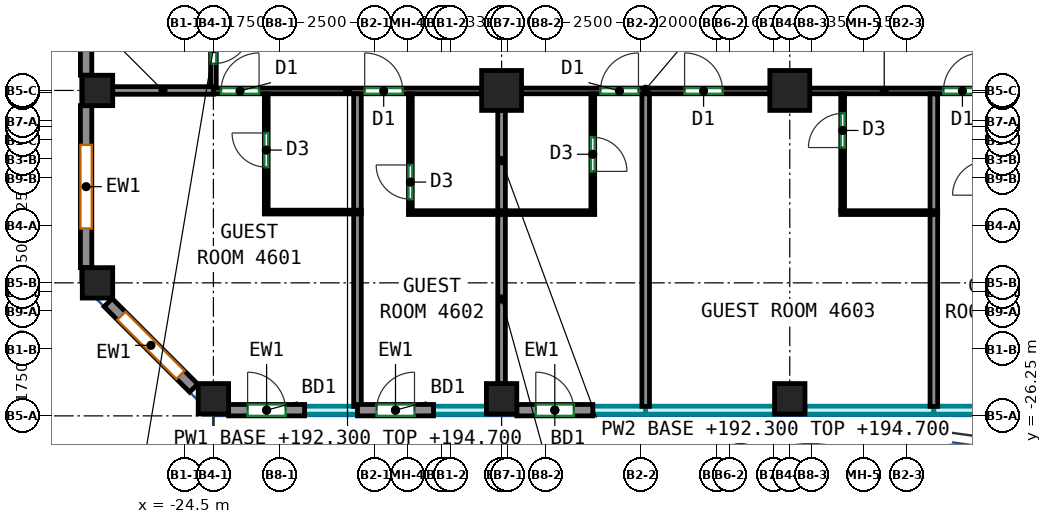
"""IFC4 building model, lengths in metres.
Left out: names, types, materials, properties, quantities, classifications, styles, units other than length and angle.
Written with IfcOpenShell. Run it as: python <this file> out.ifc"""

import sys

from ifc_helpers import new_model, si_unit, direction, frame, frame_2d, origin, origin_2d, place, context, subcontext, project, spatial, rectangle, extrude, source, transform, mapped, element, fill, save


model = new_model("IFC4")
c1 = context("Model", 3, precision=1e-05, world=origin(), true_north=direction((0.0, 1.0)))
c2 = subcontext(c1, "Body", "Model", "MODEL_VIEW")
j1 = project(units=[si_unit("LENGTHUNIT", "METRE"), si_unit("PLANEANGLEUNIT", "RADIAN")], contexts=[c1])
p1 = place(None, origin())
s1 = spatial("IfcSite", under=j1, at=p1, CompositionType="ELEMENT")
p2 = place(p1, origin())
s2 = spatial("IfcBuilding", under=s1, at=p2, CompositionType="ELEMENT")
p3 = place(p2, frame((0.0, 0.0, 192.3)))
s3 = spatial("IfcBuildingStorey", under=s2, at=p3, CompositionType="ELEMENT", Elevation=192.3)
m1 = source(origin(), c2, "Body", "SweptSolid", [
    extrude(rectangle(XDim=0.8, YDim=0.8, at=origin_2d()), origin(), (0.0, 0.0, 1.0), 3.0),
])
for number, where, z_axis, x_axis in (
    (1, (-26.8, -22.75, 0.0), (0.0, 0.0, 1.0), (1.0, 0.0, 0.0)),
    (2, (-26.8, -17.688, 0.0), (0.0, 0.0, 1.0), (1.0, 0.0, 0.0)),
    (3, (-23.75, -25.8, 0.0), (0.0, 0.0, 1.0), (1.0, 0.0, 0.0)),
    (4, (-16.167, -25.8, 0.0), (0.0, 0.0, 1.0), (1.0, 0.0, 0.0)),
):
    element("IfcColumn", number, at=place(p3, frame(where, z_axis=z_axis, x_axis=x_axis)), inside=s3, PredefinedType="COLUMN", context=c2, shape_type="MappedRepresentation", body=[
        mapped(m1, transform((0.0, 0.0, 0.0))),
    ])
m2 = source(origin(), c2, "Body", "SweptSolid", [
    extrude(rectangle(XDim=1.05, YDim=1.05, at=origin_2d()), origin(), (0.0, 0.0, 1.0), 3.0),
])
p4 = place(p3, frame((-16.167, -17.688, 0.0), z_axis=(0.0, 0.0, 1.0), x_axis=(1.0, 0.0, 0.0)))
e5 = element("IfcColumn", 5, at=p4, inside=s3, PredefinedType="COLUMN", context=c2, shape_type="MappedRepresentation", body=[
    mapped(m2, transform((0.0, 0.0, 0.0))),
])
p5 = place(p3, frame((-8.583, -25.8, 0.0), z_axis=(0.0, 0.0, 1.0), x_axis=(1.0, 0.0, 0.0)))
e6 = element("IfcColumn", 6, at=p5, inside=s3, PredefinedType="COLUMN", context=c2, shape_type="MappedRepresentation", body=[
    mapped(m1, transform((0.0, 0.0, 0.0))),
])
p6 = place(p3, frame((-8.583, -17.688, 0.0), z_axis=(0.0, 0.0, 1.0), x_axis=(1.0, 0.0, 0.0)))
e7 = element("IfcColumn", 7, at=p6, inside=s3, PredefinedType="COLUMN", context=c2, shape_type="MappedRepresentation", body=[
    mapped(m2, transform((0.0, 0.0, 0.0))),
])
m3 = source(origin(), c2, "Body", "SweptSolid", [
    extrude(rectangle(XDim=2.0, YDim=0.3, at=frame_2d((1.0, 0.0))), origin(), (0.0, 0.0, 1.0), 3.0),
])
p7 = place(p3, frame((-23.35, -26.1, 0.0), z_axis=(0.0, 0.0, 1.0), x_axis=(1.0, 0.0, 0.0)))
e8 = element("IfcWall", 8, at=p7, inside=s3, PredefinedType="SOLIDWALL", context=c2, shape_type="MappedRepresentation", body=[
    mapped(m3, transform((0.0, 0.0, 0.0))),
])
p8 = place(p7, frame((0.5, 0.0, 0.0)))
e9 = element("IfcOpeningElement", 9, at=p8, cuts=e8, PredefinedType="OPENING", context=c2, shape_type="SweptSolid", body=[
    extrude(rectangle(XDim=1.0, YDim=2.1, at=frame_2d((0.5, 1.05))), frame((0.0, 0.16, 0.0), z_axis=(0.0, -1.0, 0.0), x_axis=(1.0, 0.0, 0.0)), (0.0, 0.0, 1.0), 0.32),
])
p9 = place(p3, frame((-19.958, -26.1, 0.0), z_axis=(0.0, 0.0, 1.0), x_axis=(1.0, 0.0, 0.0)))
e10 = element("IfcWall", 10, at=p9, inside=s3, PredefinedType="SOLIDWALL", context=c2, shape_type="MappedRepresentation", body=[
    mapped(m3, transform((0.0, 0.0, 0.0))),
])
p10 = place(p9, frame((0.5, 0.0, 0.0)))
e11 = element("IfcOpeningElement", 11, at=p10, cuts=e10, PredefinedType="OPENING", context=c2, shape_type="SweptSolid", body=[
    extrude(rectangle(XDim=1.0, YDim=2.1, at=frame_2d((0.5, 1.05))), frame((0.0, 0.16, 0.0), z_axis=(0.0, -1.0, 0.0), x_axis=(1.0, 0.0, 0.0)), (0.0, 0.0, 1.0), 0.32),
])
p11 = place(p3, frame((-15.767, -26.1, 0.0), z_axis=(0.0, 0.0, 1.0), x_axis=(1.0, 0.0, 0.0)))
e12 = element("IfcWall", 12, at=p11, inside=s3, PredefinedType="SOLIDWALL", context=c2, shape_type="MappedRepresentation", body=[
    mapped(m3, transform((0.0, 0.0, 0.0))),
])
p12 = place(p11, frame((0.5, 0.0, 0.0)))
e13 = element("IfcOpeningElement", 13, at=p12, cuts=e12, PredefinedType="OPENING", context=c2, shape_type="SweptSolid", body=[
    extrude(rectangle(XDim=1.0, YDim=2.1, at=frame_2d((0.5, 1.05))), frame((0.0, 0.16, 0.0), z_axis=(0.0, -1.0, 0.0), x_axis=(1.0, 0.0, 0.0)), (0.0, 0.0, 1.0), 0.32),
])
m4 = source(origin(), c2, "Body", "SweptSolid", [
    extrude(rectangle(XDim=7.763, YDim=0.3, at=frame_2d((3.881, 0.0))), origin(), (0.0, 0.0, 1.0), 3.0),
])
p13 = place(p3, frame((-27.1, -9.525, 0.0), z_axis=(0.0, 0.0, 1.0), x_axis=(0.0, -1.0, 0.0)))
e14 = element("IfcWall", 14, at=p13, inside=s3, PredefinedType="SOLIDWALL", context=c2, shape_type="MappedRepresentation", body=[
    mapped(m4, transform((0.0, 0.0, 0.0))),
])
p14 = place(p13, frame((0.841, 0.0, 0.85)))
e15 = element("IfcOpeningElement", 15, at=p14, cuts=e14, PredefinedType="OPENING", context=c2, shape_type="SweptSolid", body=[
    extrude(rectangle(XDim=2.2, YDim=1.95, at=frame_2d((1.1, 0.975))), frame((0.0, 0.16, 0.0), z_axis=(0.0, -1.0, 0.0), x_axis=(1.0, 0.0, 0.0)), (0.0, 0.0, 1.0), 0.32),
])
p15 = place(p13, frame((4.722, 0.0, 0.85)))
e16 = element("IfcOpeningElement", 16, at=p15, cuts=e14, PredefinedType="OPENING", context=c2, shape_type="SweptSolid", body=[
    extrude(rectangle(XDim=2.2, YDim=1.95, at=frame_2d((1.1, 0.975))), frame((0.0, 0.16, 0.0), z_axis=(0.0, -1.0, 0.0), x_axis=(1.0, 0.0, 0.0)), (0.0, 0.0, 1.0), 0.32),
])
m5 = source(origin(), c2, "Body", "SweptSolid", [
    extrude(rectangle(XDim=4.263, YDim=0.3, at=frame_2d((2.131, 0.0))), origin(), (0.0, 0.0, 1.0), 3.0),
])
p16 = place(p3, frame((-27.1, -18.087, 0.0), z_axis=(0.0, 0.0, 1.0), x_axis=(0.0, -1.0, 0.0)))
e17 = element("IfcWall", 17, at=p16, inside=s3, PredefinedType="SOLIDWALL", context=c2, shape_type="MappedRepresentation", body=[
    mapped(m5, transform((0.0, 0.0, 0.0))),
])
p17 = place(p16, frame((1.031, 0.0, 0.85)))
e18 = element("IfcOpeningElement", 18, at=p17, cuts=e17, PredefinedType="OPENING", context=c2, shape_type="SweptSolid", body=[
    extrude(rectangle(XDim=2.2, YDim=1.95, at=frame_2d((1.1, 0.975))), frame((0.0, 0.16, 0.0), z_axis=(0.0, -1.0, 0.0), x_axis=(1.0, 0.0, 0.0)), (0.0, 0.0, 1.0), 0.32),
])
m6 = source(origin(), c2, "Body", "SweptSolid", [
    extrude(rectangle(XDim=3.182, YDim=0.3, at=frame_2d((1.591, 0.0))), origin(), (0.0, 0.0, 1.0), 3.0),
])
p18 = place(p3, frame((-26.519, -23.269, 0.0), z_axis=(0.0, 0.0, 1.0), x_axis=(0.707068419229, -0.707145141063, 0.0)))
e19 = element("IfcWall", 19, at=p18, inside=s3, PredefinedType="SOLIDWALL", context=c2, shape_type="MappedRepresentation", body=[
    mapped(m6, transform((0.0, 0.0, 0.0))),
])
p19 = place(p18, frame((0.491, 0.0, 0.85)))
e20 = element("IfcOpeningElement", 20, at=p19, cuts=e19, PredefinedType="OPENING", context=c2, shape_type="SweptSolid", body=[
    extrude(rectangle(XDim=2.2, YDim=1.95, at=frame_2d((1.1, 0.975))), frame((0.0, 0.16, 0.0), z_axis=(0.0, -1.0, 0.0), x_axis=(1.0, 0.0, 0.0)), (0.0, 0.0, 1.0), 0.32),
])
p20 = place(p3, frame((-23.75, -17.7, 0.0), z_axis=(0.0, 0.0, 1.0), x_axis=(1.0, 0.0, 0.0)))
e21 = element("IfcWall", 21, at=p20, inside=s3, PredefinedType="PARTITIONING", context=c2, shape_type="SweptSolid", body=[
    extrude(rectangle(XDim=7.058, YDim=0.15, at=frame_2d((3.529, 0.0))), origin(), (0.0, 0.0, 1.0), 2.4),
])
p21 = place(p20, frame((0.201, 0.0, 0.0)))
e22 = element("IfcOpeningElement", 22, at=p21, cuts=e21, PredefinedType="OPENING", context=c2, shape_type="SweptSolid", body=[
    extrude(rectangle(XDim=1.0, YDim=2.1, at=frame_2d((0.5, 1.05))), frame((0.0, 0.085, 0.0), z_axis=(0.0, -1.0, 0.0), x_axis=(1.0, 0.0, 0.0)), (0.0, 0.0, 1.0), 0.17),
])
p22 = place(p20, frame((3.981, 0.0, 0.0)))
e23 = element("IfcOpeningElement", 23, at=p22, cuts=e21, PredefinedType="OPENING", context=c2, shape_type="SweptSolid", body=[
    extrude(rectangle(XDim=1.0, YDim=2.1, at=frame_2d((0.5, 1.05))), frame((0.0, 0.085, 0.0), z_axis=(0.0, -1.0, 0.0), x_axis=(1.0, 0.0, 0.0)), (0.0, 0.0, 1.0), 0.17),
])
p23 = place(p3, frame((-15.642, -17.7, 0.0), z_axis=(0.0, 0.0, 1.0), x_axis=(1.0, 0.0, 0.0)))
e24 = element("IfcWall", 24, at=p23, inside=s3, PredefinedType="PARTITIONING", context=c2, shape_type="SweptSolid", body=[
    extrude(rectangle(XDim=6.534, YDim=0.15, at=frame_2d((3.267, 0.0))), origin(), (0.0, 0.0, 1.0), 2.4),
])
p24 = place(p23, frame((2.077, 0.0, 0.0)))
e25 = element("IfcOpeningElement", 25, at=p24, cuts=e24, PredefinedType="OPENING", context=c2, shape_type="SweptSolid", body=[
    extrude(rectangle(XDim=1.0, YDim=2.1, at=frame_2d((0.5, 1.05))), frame((0.0, 0.085, 0.0), z_axis=(0.0, -1.0, 0.0), x_axis=(1.0, 0.0, 0.0)), (0.0, 0.0, 1.0), 0.17),
])
p25 = place(p23, frame((4.291, 0.0, 0.0)))
e26 = element("IfcOpeningElement", 26, at=p25, cuts=e24, PredefinedType="OPENING", context=c2, shape_type="SweptSolid", body=[
    extrude(rectangle(XDim=1.0, YDim=2.1, at=frame_2d((0.5, 1.05))), frame((0.0, 0.085, 0.0), z_axis=(0.0, -1.0, 0.0), x_axis=(1.0, 0.0, 0.0)), (0.0, 0.0, 1.0), 0.17),
])
p26 = place(p3, frame((-8.058, -17.7, 0.0), z_axis=(0.0, 0.0, 1.0), x_axis=(1.0, 0.0, 0.0)))
e27 = element("IfcWall", 27, at=p26, inside=s3, PredefinedType="PARTITIONING", context=c2, shape_type="SweptSolid", body=[
    extrude(rectangle(XDim=6.533, YDim=0.15, at=frame_2d((3.267, 0.0))), origin(), (0.0, 0.0, 1.0), 2.4),
])
p27 = place(p26, frame((3.518, 0.0, 0.0)))
e28 = element("IfcOpeningElement", 28, at=p27, cuts=e27, PredefinedType="OPENING", context=c2, shape_type="SweptSolid", body=[
    extrude(rectangle(XDim=1.0, YDim=2.1, at=frame_2d((0.5, 1.05))), frame((0.0, 0.085, 0.0), z_axis=(0.0, -1.0, 0.0), x_axis=(1.0, 0.0, 0.0)), (0.0, 0.0, 1.0), 0.17),
])
p28 = place(p3, frame((-23.75, -15.575, 0.0), z_axis=(0.0, 0.0, 1.0), x_axis=(0.0, -1.0, 0.0)))
e29 = element("IfcWall", 29, at=p28, inside=s3, PredefinedType="PARTITIONING", context=c2, shape_type="SweptSolid", body=[
    extrude(rectangle(XDim=2.023, YDim=0.15, at=frame_2d((1.011, 0.0))), origin(), (0.0, 0.0, 1.0), 2.4),
])
p29 = place(p28, frame((0.408, 0.0, 0.0)))
e30 = element("IfcOpeningElement", 30, at=p29, cuts=e29, PredefinedType="OPENING", context=c2, shape_type="SweptSolid", body=[
    extrude(rectangle(XDim=1.0, YDim=2.1, at=frame_2d((0.5, 1.05))), frame((0.0, 0.085, 0.0), z_axis=(0.0, -1.0, 0.0), x_axis=(1.0, 0.0, 0.0)), (0.0, 0.0, 1.0), 0.17),
])
p30 = place(p3, frame((-22.359, -20.838, 0.0), z_axis=(0.0, 0.0, 1.0), x_axis=(0.0, 1.0, 0.0)))
e31 = element("IfcWall", 31, at=p30, inside=s3, PredefinedType="PARTITIONING", context=c2, shape_type="SweptSolid", body=[
    extrude(rectangle(XDim=3.061, YDim=0.1, at=frame_2d((1.53, 0.0))), origin(), (0.0, 0.0, 1.0), 3.0),
])
p31 = place(p30, frame((1.132, 0.0, 0.0)))
e32 = element("IfcOpeningElement", 32, at=p31, cuts=e31, PredefinedType="OPENING", context=c2, shape_type="SweptSolid", body=[
    extrude(rectangle(XDim=0.9, YDim=2.1, at=frame_2d((0.45, 1.05))), frame((0.0, 0.06, 0.0), z_axis=(0.0, -1.0, 0.0), x_axis=(1.0, 0.0, 0.0)), (0.0, 0.0, 1.0), 0.12),
])
p32 = place(p3, frame((-22.409, -20.888, 0.0), z_axis=(0.0, 0.0, 1.0), x_axis=(1.0, 0.0, 0.0)))
e33 = element("IfcWall", 33, at=p32, inside=s3, PredefinedType="PARTITIONING", context=c2, shape_type="SweptSolid", body=[
    extrude(rectangle(XDim=2.55, YDim=0.1, at=frame_2d((1.275, 0.0))), origin(), (0.0, 0.0, 1.0), 3.0),
])
p33 = place(p3, frame((-19.959, -26.0, 0.0), z_axis=(0.0, 0.0, 1.0), x_axis=(0.0, 1.0, 0.0)))
e34 = element("IfcWall", 34, at=p33, inside=s3, PredefinedType="PARTITIONING", context=c2, shape_type="SweptSolid", body=[
    extrude(rectangle(XDim=5.062, YDim=0.2, at=frame_2d((2.531, 0.0))), origin(), (0.0, 0.0, 1.0), 3.0),
])
p34 = place(p3, frame((-26.4, -17.688, 0.0), z_axis=(0.0, 0.0, 1.0), x_axis=(1.0, 0.0, 0.0)))
e35 = element("IfcWall", 35, at=p34, inside=s3, PredefinedType="PARTITIONING", context=c2, shape_type="SweptSolid", body=[
    extrude(rectangle(XDim=2.648, YDim=0.2, at=frame_2d((1.324, 0.0))), origin(), (0.0, 0.0, 1.0), 2.4),
])
p35 = place(p3, frame((-19.959, -20.838, 0.0), z_axis=(0.0, 0.0, 1.0), x_axis=(0.0, 1.0, 0.0)))
e36 = element("IfcWall", 36, at=p35, inside=s3, PredefinedType="PARTITIONING", context=c2, shape_type="SweptSolid", body=[
    extrude(rectangle(XDim=3.061, YDim=0.2, at=frame_2d((1.53, 0.0))), origin(), (0.0, 0.0, 1.0), 3.0),
])
p36 = place(p3, frame((-18.567, -20.852, 0.0), z_axis=(0.0, 0.0, 1.0), x_axis=(0.0, 1.0, 0.0)))
e37 = element("IfcWall", 37, at=p36, inside=s3, PredefinedType="PARTITIONING", context=c2, shape_type="SweptSolid", body=[
    extrude(rectangle(XDim=3.075, YDim=0.1, at=frame_2d((1.538, 0.0))), origin(), (0.0, 0.0, 1.0), 3.0),
])
p37 = place(p36, frame((0.304, 0.0, 0.0)))
e38 = element("IfcOpeningElement", 38, at=p37, cuts=e37, PredefinedType="OPENING", context=c2, shape_type="SweptSolid", body=[
    extrude(rectangle(XDim=0.9, YDim=2.1, at=frame_2d((0.45, 1.05))), frame((0.0, 0.06, 0.0), z_axis=(0.0, -1.0, 0.0), x_axis=(1.0, 0.0, 0.0)), (0.0, 0.0, 1.0), 0.12),
])
p38 = place(p3, frame((-18.617, -20.902, 0.0), z_axis=(0.0, 0.0, 1.0), x_axis=(1.0, 0.0, 0.0)))
e39 = element("IfcWall", 39, at=p38, inside=s3, PredefinedType="PARTITIONING", context=c2, shape_type="SweptSolid", body=[
    extrude(rectangle(XDim=4.9, YDim=0.1, at=frame_2d((2.45, 0.0))), origin(), (0.0, 0.0, 1.0), 3.0),
])
p39 = place(p3, frame((-16.167, -25.4, 0.0), z_axis=(0.0, 0.0, 1.0), x_axis=(0.0, 1.0, 0.0)))
e40 = element("IfcWall", 40, at=p39, inside=s3, PredefinedType="PARTITIONING", context=c2, shape_type="SweptSolid", body=[
    extrude(rectangle(XDim=4.448, YDim=0.2, at=frame_2d((2.224, 0.0))), origin(), (0.0, 0.0, 1.0), 2.4),
])
p40 = place(p3, frame((-16.167, -20.852, 0.0), z_axis=(0.0, 0.0, 1.0), x_axis=(0.0, 1.0, 0.0)))
e41 = element("IfcWall", 41, at=p40, inside=s3, PredefinedType="PARTITIONING", context=c2, shape_type="SweptSolid", body=[
    extrude(rectangle(XDim=2.64, YDim=0.2, at=frame_2d((1.32, 0.0))), origin(), (0.0, 0.0, 1.0), 2.4),
])
p41 = place(p3, frame((-13.767, -17.777, 0.0), z_axis=(0.0, 0.0, 1.0), x_axis=(0.0, -1.0, 0.0)))
e42 = element("IfcWall", 42, at=p41, inside=s3, PredefinedType="PARTITIONING", context=c2, shape_type="SweptSolid", body=[
    extrude(rectangle(XDim=3.075, YDim=0.1, at=frame_2d((1.538, 0.0))), origin(), (0.0, 0.0, 1.0), 3.0),
])
p42 = place(p41, frame((1.14, 0.0, 0.0)))
e43 = element("IfcOpeningElement", 43, at=p42, cuts=e42, PredefinedType="OPENING", context=c2, shape_type="SweptSolid", body=[
    extrude(rectangle(XDim=0.9, YDim=2.1, at=frame_2d((0.45, 1.05))), frame((0.0, 0.06, 0.0), z_axis=(0.0, -1.0, 0.0), x_axis=(1.0, 0.0, 0.0)), (0.0, 0.0, 1.0), 0.12),
])
p43 = place(p3, frame((-12.375, -26.0, 0.0), z_axis=(0.0, 0.0, 1.0), x_axis=(0.0, 1.0, 0.0)))
e44 = element("IfcWall", 44, at=p43, inside=s3, PredefinedType="PARTITIONING", context=c2, shape_type="SweptSolid", body=[
    extrude(rectangle(XDim=8.223, YDim=0.2, at=frame_2d((4.111, 0.0))), origin(), (0.0, 0.0, 1.0), 3.0),
])
p44 = place(p3, frame((-7.192, -20.852, 0.0), z_axis=(0.0, 0.0, 1.0), x_axis=(0.0, 1.0, 0.0)))
e45 = element("IfcWall", 45, at=p44, inside=s3, PredefinedType="PARTITIONING", context=c2, shape_type="SweptSolid", body=[
    extrude(rectangle(XDim=3.075, YDim=0.1, at=frame_2d((1.538, 0.0))), origin(), (0.0, 0.0, 1.0), 3.0),
])
p45 = place(p44, frame((1.662, 0.0, 0.0)))
e46 = element("IfcOpeningElement", 46, at=p45, cuts=e45, PredefinedType="OPENING", context=c2, shape_type="SweptSolid", body=[
    extrude(rectangle(XDim=0.9, YDim=2.1, at=frame_2d((0.45, 1.05))), frame((0.0, 0.06, 0.0), z_axis=(0.0, -1.0, 0.0), x_axis=(1.0, 0.0, 0.0)), (0.0, 0.0, 1.0), 0.12),
])
p46 = place(p3, frame((-7.242, -20.902, 0.0), z_axis=(0.0, 0.0, 1.0), x_axis=(1.0, 0.0, 0.0)))
e47 = element("IfcWall", 47, at=p46, inside=s3, PredefinedType="PARTITIONING", context=c2, shape_type="SweptSolid", body=[
    extrude(rectangle(XDim=2.55, YDim=0.1, at=frame_2d((1.275, 0.0))), origin(), (0.0, 0.0, 1.0), 3.0),
])
p47 = place(p3, frame((-4.792, -26.0, 0.0), z_axis=(0.0, 0.0, 1.0), x_axis=(0.0, 1.0, 0.0)))
e48 = element("IfcWall", 48, at=p47, inside=s3, PredefinedType="PARTITIONING", context=c2, shape_type="SweptSolid", body=[
    extrude(rectangle(XDim=5.048, YDim=0.2, at=frame_2d((2.524, 0.0))), origin(), (0.0, 0.0, 1.0), 3.0),
])
p48 = place(p3, frame((-4.792, -20.852, 0.0), z_axis=(0.0, 0.0, 1.0), x_axis=(0.0, 1.0, 0.0)))
e49 = element("IfcWall", 49, at=p48, inside=s3, PredefinedType="PARTITIONING", context=c2, shape_type="SweptSolid", body=[
    extrude(rectangle(XDim=3.075, YDim=0.2, at=frame_2d((1.538, 0.0))), origin(), (0.0, 0.0, 1.0), 3.0),
])
p49 = place(p8, origin())
e50 = element("IfcDoor", 50, at=p49, inside=s3, OperationType="SINGLE_SWING_LEFT", PredefinedType="DOOR", context=c2, shape_type="SweptSolid", body=[
    extrude(rectangle(XDim=1.0, YDim=2.1, at=frame_2d((0.5, 1.05))), frame((0.0, 0.025, 0.0), z_axis=(0.0, -1.0, 0.0), x_axis=(1.0, 0.0, 0.0)), (0.0, 0.0, 1.0), 0.05),
])
fill(e9, e50)
p50 = place(p10, origin())
e51 = element("IfcDoor", 51, at=p50, inside=s3, OperationType="SINGLE_SWING_RIGHT", PredefinedType="DOOR", context=c2, shape_type="SweptSolid", body=[
    extrude(rectangle(XDim=1.0, YDim=2.1, at=frame_2d((0.5, 1.05))), frame((0.0, 0.025, 0.0), z_axis=(0.0, -1.0, 0.0), x_axis=(1.0, 0.0, 0.0)), (0.0, 0.0, 1.0), 0.05),
])
fill(e11, e51)
p51 = place(p12, origin())
e52 = element("IfcDoor", 52, at=p51, inside=s3, OperationType="SINGLE_SWING_LEFT", PredefinedType="DOOR", context=c2, shape_type="SweptSolid", body=[
    extrude(rectangle(XDim=1.0, YDim=2.1, at=frame_2d((0.5, 1.05))), frame((0.0, 0.025, 0.0), z_axis=(0.0, -1.0, 0.0), x_axis=(1.0, 0.0, 0.0)), (0.0, 0.0, 1.0), 0.05),
])
fill(e13, e52)
p52 = place(p17, origin())
e53 = element("IfcWindow", 53, at=p52, inside=s3, PartitioningType="SINGLE_PANEL", PredefinedType="WINDOW", context=c2, shape_type="SweptSolid", body=[
    extrude(rectangle(XDim=2.2, YDim=1.95, at=frame_2d((1.1, 0.975))), frame((0.0, 0.03, 0.0), z_axis=(0.0, -1.0, 0.0), x_axis=(1.0, 0.0, 0.0)), (0.0, 0.0, 1.0), 0.06),
])
fill(e18, e53)
p53 = place(p19, origin())
e54 = element("IfcWindow", 54, at=p53, inside=s3, PartitioningType="SINGLE_PANEL", PredefinedType="WINDOW", context=c2, shape_type="SweptSolid", body=[
    extrude(rectangle(XDim=2.2, YDim=1.95, at=frame_2d((1.1, 0.975))), frame((0.0, 0.03, 0.0), z_axis=(0.0, -1.0, 0.0), x_axis=(1.0, 0.0, 0.0)), (0.0, 0.0, 1.0), 0.06),
])
fill(e20, e54)
p54 = place(p37, origin())
e55 = element("IfcDoor", 55, at=p54, inside=s3, OperationType="SINGLE_SWING_RIGHT", PredefinedType="DOOR", context=c2, shape_type="SweptSolid", body=[
    extrude(rectangle(XDim=0.9, YDim=2.1, at=frame_2d((0.45, 1.05))), frame((0.0, 0.025, 0.0), z_axis=(0.0, -1.0, 0.0), x_axis=(1.0, 0.0, 0.0)), (0.0, 0.0, 1.0), 0.05),
])
fill(e38, e55)
p55 = place(p42, origin())
e56 = element("IfcDoor", 56, at=p55, inside=s3, OperationType="SINGLE_SWING_RIGHT", PredefinedType="DOOR", context=c2, shape_type="SweptSolid", body=[
    extrude(rectangle(XDim=0.9, YDim=2.1, at=frame_2d((0.45, 1.05))), frame((0.0, 0.025, 0.0), z_axis=(0.0, -1.0, 0.0), x_axis=(1.0, 0.0, 0.0)), (0.0, 0.0, 1.0), 0.05),
])
fill(e43, e56)
p56 = place(p31, origin())
e57 = element("IfcDoor", 57, at=p56, inside=s3, OperationType="SINGLE_SWING_RIGHT", PredefinedType="DOOR", context=c2, shape_type="SweptSolid", body=[
    extrude(rectangle(XDim=0.9, YDim=2.1, at=frame_2d((0.45, 1.05))), frame((0.0, 0.025, 0.0), z_axis=(0.0, -1.0, 0.0), x_axis=(1.0, 0.0, 0.0)), (0.0, 0.0, 1.0), 0.05),
])
fill(e32, e57)
p57 = place(p45, origin())
e58 = element("IfcDoor", 58, at=p57, inside=s3, OperationType="SINGLE_SWING_LEFT", PredefinedType="DOOR", context=c2, shape_type="SweptSolid", body=[
    extrude(rectangle(XDim=0.9, YDim=2.1, at=frame_2d((0.45, 1.05))), frame((0.0, 0.025, 0.0), z_axis=(0.0, -1.0, 0.0), x_axis=(1.0, 0.0, 0.0)), (0.0, 0.0, 1.0), 0.05),
])
fill(e46, e58)
p58 = place(p21, origin())
e59 = element("IfcDoor", 59, at=p58, inside=s3, OperationType="SINGLE_SWING_RIGHT", PredefinedType="DOOR", context=c2, shape_type="SweptSolid", body=[
    extrude(rectangle(XDim=1.0, YDim=2.1, at=frame_2d((0.5, 1.05))), frame((0.0, 0.025, 0.0), z_axis=(0.0, -1.0, 0.0), x_axis=(1.0, 0.0, 0.0)), (0.0, 0.0, 1.0), 0.05),
])
fill(e22, e59)
p59 = place(p22, origin())
e60 = element("IfcDoor", 60, at=p59, inside=s3, OperationType="SINGLE_SWING_LEFT", PredefinedType="DOOR", context=c2, shape_type="SweptSolid", body=[
    extrude(rectangle(XDim=1.0, YDim=2.1, at=frame_2d((0.5, 1.05))), frame((0.0, 0.025, 0.0), z_axis=(0.0, -1.0, 0.0), x_axis=(1.0, 0.0, 0.0)), (0.0, 0.0, 1.0), 0.05),
])
fill(e23, e60)
p60 = place(p24, origin())
e61 = element("IfcDoor", 61, at=p60, inside=s3, OperationType="SINGLE_SWING_RIGHT", PredefinedType="DOOR", context=c2, shape_type="SweptSolid", body=[
    extrude(rectangle(XDim=1.0, YDim=2.1, at=frame_2d((0.5, 1.05))), frame((0.0, 0.025, 0.0), z_axis=(0.0, -1.0, 0.0), x_axis=(1.0, 0.0, 0.0)), (0.0, 0.0, 1.0), 0.05),
])
fill(e25, e61)
p61 = place(p25, origin())
e62 = element("IfcDoor", 62, at=p61, inside=s3, OperationType="SINGLE_SWING_LEFT", PredefinedType="DOOR", context=c2, shape_type="SweptSolid", body=[
    extrude(rectangle(XDim=1.0, YDim=2.1, at=frame_2d((0.5, 1.05))), frame((0.0, 0.025, 0.0), z_axis=(0.0, -1.0, 0.0), x_axis=(1.0, 0.0, 0.0)), (0.0, 0.0, 1.0), 0.05),
])
fill(e26, e62)
p62 = place(p27, origin())
e63 = element("IfcDoor", 63, at=p62, inside=s3, OperationType="SINGLE_SWING_RIGHT", PredefinedType="DOOR", context=c2, shape_type="SweptSolid", body=[
    extrude(rectangle(XDim=1.0, YDim=2.1, at=frame_2d((0.5, 1.05))), frame((0.0, 0.025, 0.0), z_axis=(0.0, -1.0, 0.0), x_axis=(1.0, 0.0, 0.0)), (0.0, 0.0, 1.0), 0.05),
])
fill(e28, e63)
p63 = place(p29, origin())
e64 = element("IfcDoor", 64, at=p63, inside=s3, OperationType="SINGLE_SWING_LEFT", PredefinedType="DOOR", context=c2, shape_type="SweptSolid", body=[
    extrude(rectangle(XDim=1.0, YDim=2.1, at=frame_2d((0.5, 1.05))), frame((0.0, 0.025, 0.0), z_axis=(0.0, -1.0, 0.0), x_axis=(1.0, 0.0, 0.0)), (0.0, 0.0, 1.0), 0.05),
])
fill(e30, e64)
save(model, sys.argv[1])
